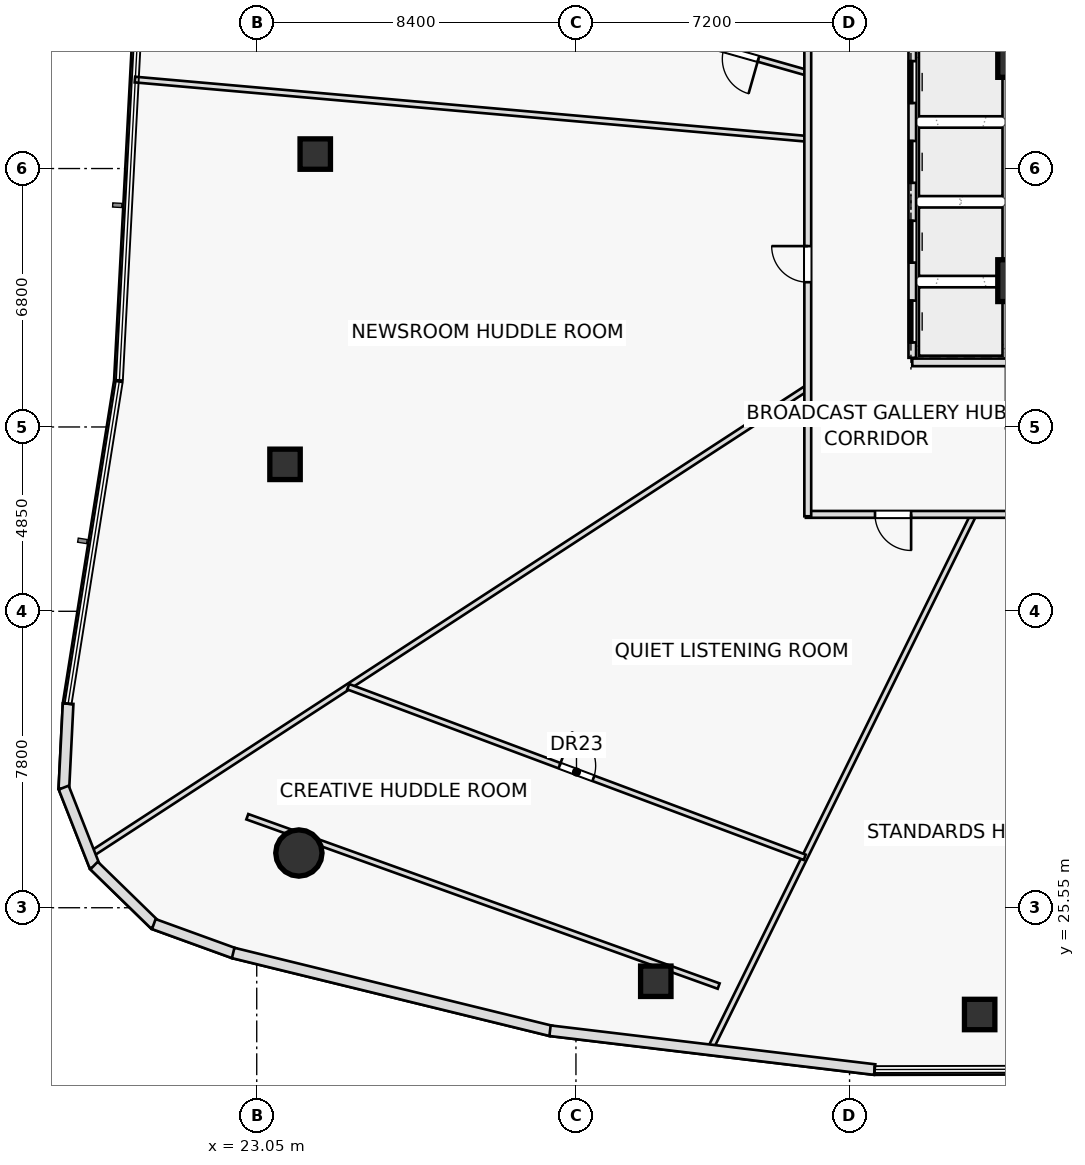
"""IFC4 building model, lengths in metres.
Left out: names, types, materials, properties, quantities, classifications, styles, units other than length and angle.
Written with IfcOpenShell. Run it as: python <this file> out.ifc"""

import sys

from ifc_helpers import new_model, si_unit, direction, frame, frame_2d, origin, origin_2d, place, context, subcontext, project, spatial, rectangle, hollow_rectangle, hollow_circle, extrude, element, fill, save


model = new_model("IFC4")
c1 = context("Model", 3, precision=1e-05, world=origin(), true_north=direction((0.0, 1.0)))
c2 = subcontext(c1, "Body", "Model", "MODEL_VIEW")
j1 = project(units=[si_unit("LENGTHUNIT", "METRE"), si_unit("PLANEANGLEUNIT", "RADIAN")], contexts=[c1])
p1 = place(None, origin())
s1 = spatial("IfcSite", under=j1, at=p1, CompositionType="ELEMENT")
p2 = place(p1, origin())
s2 = spatial("IfcBuilding", under=s1, at=p2, CompositionType="ELEMENT")
p3 = place(p2, frame((0.0, 0.0, 39.3)))
s3 = spatial("IfcBuildingStorey", under=s2, at=p3, CompositionType="ELEMENT", Elevation=39.3)
for number, where, z_axis, x_axis in (
    (1, (43.1, 47.95, 0.0), (0.0, 0.0, 1.0), (1.0, 0.0, 0.0)),
    (2, (43.1, 42.05, 0.0), (0.0, 0.0, 1.0), (1.0, 0.0, 0.0)),
):
    element("IfcColumn", number, at=place(p3, frame(where, z_axis=z_axis, x_axis=x_axis)), inside=s3, PredefinedType="COLUMN", context=c2, shape_type="SweptSolid", body=[
        extrude(rectangle(XDim=1.1, YDim=1.1, at=origin_2d()), origin(), (0.0, 0.0, 1.0), 3.6),
    ])
for number, where, z_axis, x_axis in (
    (3, (24.59, 45.381, 0.0), (0.0, 0.0, 1.0), (1.0, 0.0, 0.0)),
    (4, (23.795, 37.216, 0.0), (0.0, 0.0, 1.0), (1.0, 0.0, 0.0)),
):
    element("IfcColumn", number, at=place(p3, frame(where, z_axis=z_axis, x_axis=x_axis)), inside=s3, PredefinedType="COLUMN", context=c2, shape_type="SweptSolid", body=[
        extrude(hollow_rectangle(XDim=0.8, YDim=0.8, WallThickness=0.045, at=origin_2d()), origin(), (0.0, 0.0, 1.0), 3.6),
    ])
p4 = place(p3, frame((24.159, 26.99, 0.0), z_axis=(0.0, 0.0, 1.0), x_axis=(1.0, 0.0, 0.0)))
e5 = element("IfcColumn", 5, at=p4, inside=s3, PredefinedType="COLUMN", context=c2, shape_type="SweptSolid", body=[
    extrude(hollow_circle(Radius=0.61, WallThickness=0.05, at=origin_2d()), origin(), (0.0, 0.0, 1.0), 3.6),
])
for number, where, z_axis, x_axis in (
    (6, (33.551, 23.615, 0.0), (0.0, 0.0, 1.0), (1.0, 0.0, 0.0)),
    (7, (42.073, 22.74, 0.0), (0.0, 0.0, 1.0), (1.0, 0.0, 0.0)),
):
    element("IfcColumn", number, at=place(p3, frame(where, z_axis=z_axis, x_axis=x_axis)), inside=s3, PredefinedType="COLUMN", context=c2, shape_type="SweptSolid", body=[
        extrude(hollow_rectangle(XDim=0.8, YDim=0.8, WallThickness=0.045, at=origin_2d()), origin(), (0.0, 0.0, 1.0), 3.6),
    ])
p5 = place(p3, frame((40.3, 39.9, 0.0), z_axis=(0.0, 0.0, 1.0), x_axis=(1.0, 0.0, 0.0)))
e8 = element("IfcWall", 8, at=p5, inside=s3, PredefinedType="PARTITIONING", context=c2, shape_type="SweptSolid", body=[
    extrude(rectangle(XDim=2.5, YDim=0.2, at=frame_2d((1.25, 0.0))), origin(), (0.0, 0.0, 1.0), 3.6),
])
p6 = place(p3, frame((22.802, 27.945, 0.0), z_axis=(0.0, 0.0, 1.0), x_axis=(0.941102349209, -0.338121824662, 0.0)))
e9 = element("IfcWall", 9, at=p6, inside=s3, PredefinedType="PARTITIONING", context=c2, shape_type="SweptSolid", body=[
    extrude(rectangle(XDim=13.18, YDim=0.15, at=frame_2d((6.59, 0.0))), origin(), (0.0, 0.0, 1.0), 2.925),
])
p7 = place(p3, frame((37.55, 47.514, 0.0), z_axis=(0.0, 0.0, 1.0), x_axis=(-0.96193153625, 0.273290540574, 0.0)))
e10 = element("IfcWall", 10, at=p7, inside=s3, PredefinedType="PARTITIONING", context=c2, shape_type="SweptSolid", body=[
    extrude(rectangle(XDim=16.796, YDim=0.15, at=frame_2d((8.398, 0.0))), origin(), (0.0, 0.0, 1.0), 2.925),
])
p8 = place(p7, frame((1.35, 0.0, 0.0)))
e11 = element("IfcOpeningElement", 11, at=p8, cuts=e10, PredefinedType="OPENING", context=c2, shape_type="SweptSolid", body=[
    extrude(rectangle(XDim=0.95, YDim=2.05, at=frame_2d((0.475, 1.025))), frame((0.0, 0.085, 0.0), z_axis=(0.0, -1.0, 0.0), x_axis=(1.0, 0.0, 0.0)), (0.0, 0.0, 1.0), 0.17),
])
p9 = place(p3, frame((37.55, 45.78, 0.0), z_axis=(0.0, 0.0, 1.0), x_axis=(-0.99613586072, 0.087825662467, 0.0)))
e12 = element("IfcWall", 12, at=p9, inside=s3, PredefinedType="PARTITIONING", context=c2, shape_type="SweptSolid", body=[
    extrude(rectangle(XDim=17.774, YDim=0.15, at=frame_2d((8.887, 0.0))), origin(), (0.0, 0.0, 1.0), 2.925),
])
p10 = place(p3, frame((37.55, 39.238, 0.0), z_axis=(0.0, 0.0, 1.0), x_axis=(-0.838030442993, -0.545623475134, 0.0)))
e13 = element("IfcWall", 13, at=p10, inside=s3, PredefinedType="PARTITIONING", context=c2, shape_type="SweptSolid", body=[
    extrude(rectangle(XDim=22.545, YDim=0.15, at=frame_2d((11.272, 0.0))), origin(), (0.0, 0.0, 1.0), 2.925),
])
p11 = place(p3, frame((41.916, 35.9, 0.0), z_axis=(0.0, 0.0, 1.0), x_axis=(-0.442005604852, -0.897012288255, 0.0)))
e14 = element("IfcWall", 14, at=p11, inside=s3, PredefinedType="PARTITIONING", context=c2, shape_type="SweptSolid", body=[
    extrude(rectangle(XDim=15.718, YDim=0.15, at=frame_2d((7.859, 0.0))), origin(), (0.0, 0.0, 1.0), 2.975),
])
p12 = place(p3, frame((25.458, 31.365, 0.0), z_axis=(0.0, 0.0, 1.0), x_axis=(0.936733084101, -0.350044467391, 0.0)))
e15 = element("IfcWall", 15, at=p12, inside=s3, PredefinedType="PARTITIONING", context=c2, shape_type="SweptSolid", body=[
    extrude(rectangle(XDim=12.823, YDim=0.15, at=frame_2d((6.411, 0.0))), origin(), (0.0, 0.0, 1.0), 2.925),
])
p13 = place(p12, frame((5.936, 0.0, 0.0)))
e16 = element("IfcOpeningElement", 16, at=p13, cuts=e15, PredefinedType="OPENING", context=c2, shape_type="SweptSolid", body=[
    extrude(rectangle(XDim=0.95, YDim=2.05, at=frame_2d((0.475, 1.025))), frame((0.0, 0.085, 0.0), z_axis=(0.0, -1.0, 0.0), x_axis=(1.0, 0.0, 0.0)), (0.0, 0.0, 1.0), 0.17),
])
p14 = place(p3, frame((59.55, 35.9, 0.0), z_axis=(0.0, 0.0, 1.0), x_axis=(-1.0, 0.0, 0.0)))
e17 = element("IfcWall", 17, at=p14, inside=s3, PredefinedType="PARTITIONING", context=c2, shape_type="SweptSolid", body=[
    extrude(rectangle(XDim=22.05, YDim=0.18, at=frame_2d((11.025, 0.0))), origin(), (0.0, 0.0, 1.0), 2.925),
])
p15 = place(p14, frame((2.193, 0.0, 0.0)))
e18 = element("IfcOpeningElement", 18, at=p15, cuts=e17, PredefinedType="OPENING", context=c2, shape_type="SweptSolid", body=[
    extrude(rectangle(XDim=0.95, YDim=2.05, at=frame_2d((0.475, 1.025))), frame((0.0, 0.1, 0.0), z_axis=(0.0, -1.0, 0.0), x_axis=(1.0, 0.0, 0.0)), (0.0, 0.0, 1.0), 0.2),
])
p16 = place(p14, frame((8.49, 0.0, 0.0)))
e19 = element("IfcOpeningElement", 19, at=p16, cuts=e17, PredefinedType="OPENING", context=c2, shape_type="SweptSolid", body=[
    extrude(rectangle(XDim=0.95, YDim=2.05, at=frame_2d((0.475, 1.025))), frame((0.0, 0.1, 0.0), z_axis=(0.0, -1.0, 0.0), x_axis=(1.0, 0.0, 0.0)), (0.0, 0.0, 1.0), 0.2),
])
p17 = place(p14, frame((14.76, 0.0, 0.0)))
e20 = element("IfcOpeningElement", 20, at=p17, cuts=e17, PredefinedType="OPENING", context=c2, shape_type="SweptSolid", body=[
    extrude(rectangle(XDim=0.95, YDim=2.05, at=frame_2d((0.475, 1.025))), frame((0.0, 0.1, 0.0), z_axis=(0.0, -1.0, 0.0), x_axis=(1.0, 0.0, 0.0)), (0.0, 0.0, 1.0), 0.2),
])
p18 = place(p14, frame((19.281, 0.0, 0.0)))
e21 = element("IfcOpeningElement", 21, at=p18, cuts=e17, PredefinedType="OPENING", context=c2, shape_type="SweptSolid", body=[
    extrude(rectangle(XDim=0.95, YDim=2.05, at=frame_2d((0.475, 1.025))), frame((0.0, 0.1, 0.0), z_axis=(0.0, -1.0, 0.0), x_axis=(1.0, 0.0, 0.0)), (0.0, 0.0, 1.0), 0.2),
])
p19 = place(p3, frame((37.55, 35.85, 0.0), z_axis=(0.0, 0.0, 1.0), x_axis=(0.0, 1.0, 0.0)))
e22 = element("IfcWall", 22, at=p19, inside=s3, PredefinedType="PARTITIONING", context=c2, shape_type="SweptSolid", body=[
    extrude(rectangle(XDim=12.65, YDim=0.18, at=frame_2d((6.325, 0.0))), origin(), (0.0, 0.0, 1.0), 2.925),
])
p20 = place(p19, frame((6.159, 0.0, 0.0)))
e23 = element("IfcOpeningElement", 23, at=p20, cuts=e22, PredefinedType="OPENING", context=c2, shape_type="SweptSolid", body=[
    extrude(rectangle(XDim=0.95, YDim=2.05, at=frame_2d((0.475, 1.025))), frame((0.0, 0.1, 0.0), z_axis=(0.0, -1.0, 0.0), x_axis=(1.0, 0.0, 0.0)), (0.0, 0.0, 1.0), 0.2),
])
p21 = place(p3, frame((18.087, 30.92, 0.0), z_axis=(0.0, 0.0, 1.0), x_axis=(-0.049790898489, -0.998759663997, 0.0)))
e24 = element("IfcWall", 24, at=p21, inside=s3, PredefinedType="STANDARD", context=c2, shape_type="SweptSolid", body=[
    extrude(rectangle(XDim=2.241, YDim=0.28, at=frame_2d((1.12, 0.0))), origin(), (0.0, 0.0, 1.0), 3.6),
])
for number, where, z_axis, x_axis in (
    (25, (17.971, 28.711, 0.0), (0.0, 0.0, 1.0), (0.366, -0.931, 0.0)),
    (26, (18.77, 26.66, 0.0), (0.0, 0.0, 1.0), (0.716, -0.698, 0.0)),
):
    element("IfcWall", number, at=place(p3, frame(where, z_axis=z_axis, x_axis=x_axis)), inside=s3, PredefinedType="STANDARD", context=c2, shape_type="SweptSolid", body=[
        extrude(rectangle(XDim=2.229, YDim=0.28, at=frame_2d((1.115, 0.0))), origin(), (0.0, 0.0, 1.0), 3.6),
    ])
p22 = place(p3, frame((20.342, 25.12, 0.0), z_axis=(0.0, 0.0, 1.0), x_axis=(0.940005310642, -0.341159810009, 0.0)))
e27 = element("IfcWall", 27, at=p22, inside=s3, PredefinedType="STANDARD", context=c2, shape_type="SweptSolid", body=[
    extrude(rectangle(XDim=2.252, YDim=0.28, at=frame_2d((1.126, 0.0))), origin(), (0.0, 0.0, 1.0), 3.6),
])
p23 = place(p3, frame((22.43, 24.36, 0.0), z_axis=(0.0, 0.0, 1.0), x_axis=(0.9712343435, -0.23812570211, 0.0)))
e28 = element("IfcWall", 28, at=p23, inside=s3, PredefinedType="STANDARD", context=c2, shape_type="SweptSolid", body=[
    extrude(rectangle(XDim=8.615, YDim=0.28, at=frame_2d((4.308, 0.0))), origin(), (0.0, 0.0, 1.0), 3.6),
])
p24 = place(p3, frame((30.768, 22.314, 0.0), z_axis=(0.0, 0.0, 1.0), x_axis=(0.992909698215, -0.118871069615, 0.0)))
e29 = element("IfcWall", 29, at=p24, inside=s3, PredefinedType="STANDARD", context=c2, shape_type="SweptSolid", body=[
    extrude(rectangle(XDim=8.604, YDim=0.28, at=frame_2d((4.302, 0.0))), origin(), (0.0, 0.0, 1.0), 3.6),
])
p25 = place(p3, frame((40.3, 40.02, 0.0), z_axis=(0.0, 0.0, 1.0), x_axis=(0.0, 1.0, 0.0)))
e30 = element("IfcWall", 30, at=p25, inside=s3, PredefinedType="PARTITIONING", context=c2, shape_type="SweptSolid", body=[
    extrude(rectangle(XDim=8.21, YDim=0.2, at=frame_2d((4.105, 0.0))), origin(), (0.0, 0.0, 1.0), 3.6),
])
p26 = place(p25, frame((0.405, 0.0, 0.0)))
e31 = element("IfcOpeningElement", 31, at=p26, cuts=e30, PredefinedType="OPENING", context=c2, shape_type="SweptSolid", body=[
    extrude(rectangle(XDim=1.1, YDim=2.15, at=frame_2d((0.55, 1.075))), frame((0.0, 0.11, 0.0), z_axis=(0.0, -1.0, 0.0), x_axis=(1.0, 0.0, 0.0)), (0.0, 0.0, 1.0), 0.22),
])
p27 = place(p25, frame((2.505, 0.0, 0.0)))
e32 = element("IfcOpeningElement", 32, at=p27, cuts=e30, PredefinedType="OPENING", context=c2, shape_type="SweptSolid", body=[
    extrude(rectangle(XDim=1.1, YDim=2.15, at=frame_2d((0.55, 1.075))), frame((0.0, 0.11, 0.0), z_axis=(0.0, -1.0, 0.0), x_axis=(1.0, 0.0, 0.0)), (0.0, 0.0, 1.0), 0.22),
])
p28 = place(p25, frame((4.605, 0.0, 0.0)))
e33 = element("IfcOpeningElement", 33, at=p28, cuts=e30, PredefinedType="OPENING", context=c2, shape_type="SweptSolid", body=[
    extrude(rectangle(XDim=1.1, YDim=2.15, at=frame_2d((0.55, 1.075))), frame((0.0, 0.11, 0.0), z_axis=(0.0, -1.0, 0.0), x_axis=(1.0, 0.0, 0.0)), (0.0, 0.0, 1.0), 0.22),
])
p29 = place(p25, frame((6.705, 0.0, 0.0)))
e34 = element("IfcOpeningElement", 34, at=p29, cuts=e30, PredefinedType="OPENING", context=c2, shape_type="SweptSolid", body=[
    extrude(rectangle(XDim=1.1, YDim=2.15, at=frame_2d((0.55, 1.075))), frame((0.0, 0.11, 0.0), z_axis=(0.0, -1.0, 0.0), x_axis=(1.0, 0.0, 0.0)), (0.0, 0.0, 1.0), 0.22),
])
p30 = place(p8, origin())
e35 = element("IfcDoor", 35, at=p30, inside=s3, OperationType="SINGLE_SWING_LEFT", PredefinedType="DOOR", context=c2, shape_type="SweptSolid", body=[
    extrude(rectangle(XDim=0.95, YDim=2.05, at=frame_2d((0.475, 1.025))), frame((0.0, 0.025, 0.0), z_axis=(0.0, -1.0, 0.0), x_axis=(1.0, 0.0, 0.0)), (0.0, 0.0, 1.0), 0.05),
])
fill(e11, e35)
p31 = place(p13, origin())
e36 = element("IfcDoor", 36, at=p31, inside=s3, OperationType="SINGLE_SWING_LEFT", PredefinedType="DOOR", context=c2, shape_type="SweptSolid", body=[
    extrude(rectangle(XDim=0.95, YDim=2.05, at=frame_2d((0.475, 1.025))), frame((0.0, 0.025, 0.0), z_axis=(0.0, -1.0, 0.0), x_axis=(1.0, 0.0, 0.0)), (0.0, 0.0, 1.0), 0.05),
])
fill(e16, e36)
p32 = place(p18, origin())
e37 = element("IfcDoor", 37, at=p32, inside=s3, OperationType="SINGLE_SWING_LEFT", PredefinedType="DOOR", context=c2, shape_type="SweptSolid", body=[
    extrude(rectangle(XDim=0.95, YDim=2.05, at=frame_2d((0.475, 1.025))), frame((0.0, 0.025, 0.0), z_axis=(0.0, -1.0, 0.0), x_axis=(1.0, 0.0, 0.0)), (0.0, 0.0, 1.0), 0.05),
])
fill(e21, e37)
p33 = place(p20, origin())
e38 = element("IfcDoor", 38, at=p33, inside=s3, OperationType="SINGLE_SWING_RIGHT", PredefinedType="DOOR", context=c2, shape_type="SweptSolid", body=[
    extrude(rectangle(XDim=0.95, YDim=2.05, at=frame_2d((0.475, 1.025))), frame((0.0, 0.025, 0.0), z_axis=(0.0, -1.0, 0.0), x_axis=(1.0, 0.0, 0.0)), (0.0, 0.0, 1.0), 0.05),
])
fill(e23, e38)
p34 = place(p26, origin())
e39 = element("IfcDoor", 39, at=p34, inside=s3, OperationType="SLIDING_TO_LEFT", PredefinedType="DOOR", context=c2, shape_type="SweptSolid", body=[
    extrude(rectangle(XDim=1.1, YDim=2.15, at=frame_2d((0.55, 1.075))), frame((0.0, 0.025, 0.0), z_axis=(0.0, -1.0, 0.0), x_axis=(1.0, 0.0, 0.0)), (0.0, 0.0, 1.0), 0.05),
])
fill(e31, e39)
p35 = place(p27, origin())
e40 = element("IfcDoor", 40, at=p35, inside=s3, OperationType="SLIDING_TO_RIGHT", PredefinedType="DOOR", context=c2, shape_type="SweptSolid", body=[
    extrude(rectangle(XDim=1.1, YDim=2.15, at=frame_2d((0.55, 1.075))), frame((0.0, 0.025, 0.0), z_axis=(0.0, -1.0, 0.0), x_axis=(1.0, 0.0, 0.0)), (0.0, 0.0, 1.0), 0.05),
])
fill(e32, e40)
p36 = place(p28, origin())
e41 = element("IfcDoor", 41, at=p36, inside=s3, OperationType="SLIDING_TO_LEFT", PredefinedType="DOOR", context=c2, shape_type="SweptSolid", body=[
    extrude(rectangle(XDim=1.1, YDim=2.15, at=frame_2d((0.55, 1.075))), frame((0.0, 0.025, 0.0), z_axis=(0.0, -1.0, 0.0), x_axis=(1.0, 0.0, 0.0)), (0.0, 0.0, 1.0), 0.05),
])
fill(e33, e41)
p37 = place(p29, origin())
e42 = element("IfcDoor", 42, at=p37, inside=s3, OperationType="SLIDING_TO_RIGHT", PredefinedType="DOOR", context=c2, shape_type="SweptSolid", body=[
    extrude(rectangle(XDim=1.1, YDim=2.15, at=frame_2d((0.55, 1.075))), frame((0.0, 0.025, 0.0), z_axis=(0.0, -1.0, 0.0), x_axis=(1.0, 0.0, 0.0)), (0.0, 0.0, 1.0), 0.05),
])
fill(e34, e42)
save(model, sys.argv[1])
